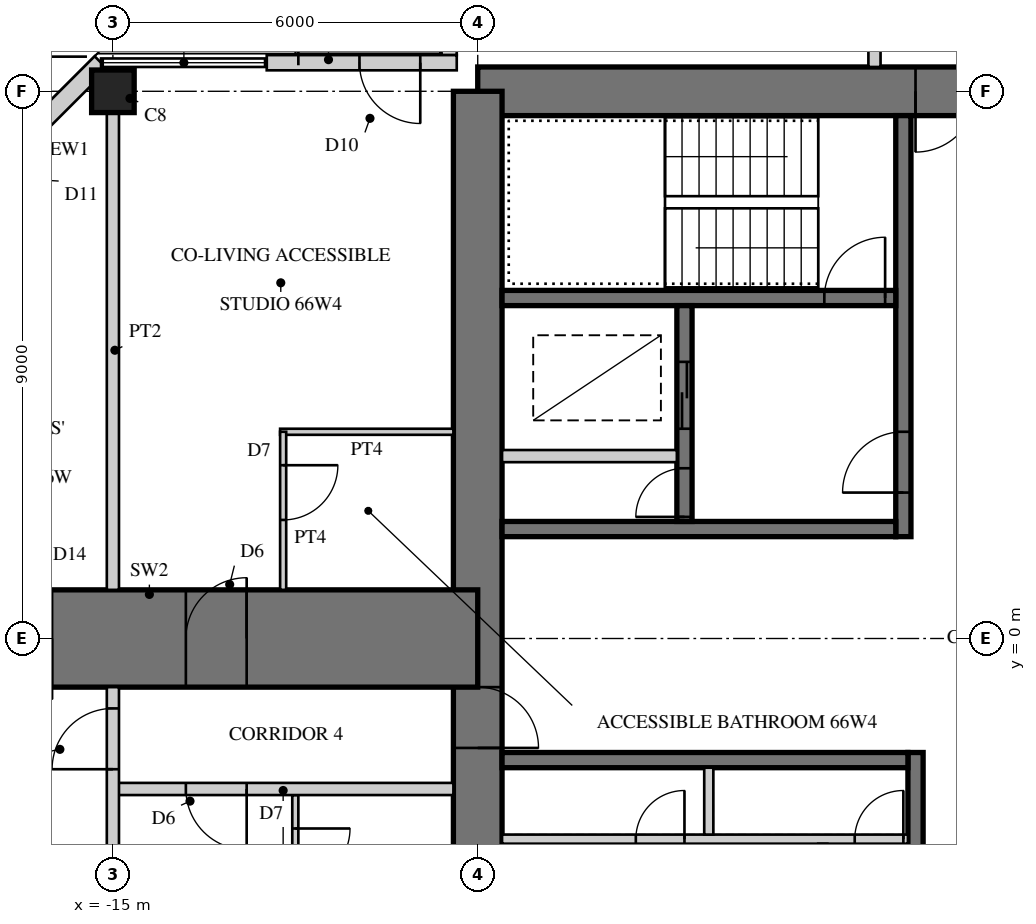
"""IFC4 building model, lengths in metres.
Left out: names, types, materials, properties, quantities, classifications, styles, units other than length and angle.
Written with IfcOpenShell. Run it as: python <this file> out.ifc"""

import sys

from ifc_helpers import new_model, si_unit, direction, frame, frame_2d, origin, origin_2d, place, context, subcontext, project, spatial, rectangle, hollow_rectangle, extrude, element, fill, save


model = new_model("IFC4")
c1 = context("Model", 3, precision=1e-05, world=origin(), true_north=direction((0.0, 1.0)))
c2 = subcontext(c1, "Body", "Model", "MODEL_VIEW")
j1 = project(units=[si_unit("LENGTHUNIT", "METRE"), si_unit("PLANEANGLEUNIT", "RADIAN")], contexts=[c1])
p1 = place(None, origin())
s1 = spatial("IfcSite", under=j1, at=p1, CompositionType="ELEMENT")
p2 = place(p1, origin())
s2 = spatial("IfcBuilding", under=s1, at=p2, CompositionType="ELEMENT")
p3 = place(p2, frame((0.0, 0.0, 257.7)))
s3 = spatial("IfcBuildingStorey", under=s2, at=p3, CompositionType="ELEMENT", Elevation=257.7)
p4 = place(p3, frame((9.0, 9.0, 0.0), z_axis=(0.0, 0.0, 1.0), x_axis=(-1.0, 0.0, 0.0)))
e1 = element("IfcWall", 1, at=p4, inside=s3, PredefinedType="SHEAR", context=c2, shape_type="SweptSolid", body=[
    extrude(rectangle(XDim=18.0, YDim=0.8, at=frame_2d((9.0, 0.0))), origin(), (0.0, 0.0, 1.0), 3.4),
])
p5 = place(p4, frame((9.8, 0.0, 0.0)))
e2 = element("IfcOpeningElement", 2, at=p5, cuts=e1, PredefinedType="OPENING", context=c2, shape_type="SweptSolid", body=[
    extrude(rectangle(XDim=1.0, YDim=2.4, at=frame_2d((0.5, 1.2))), frame((0.0, 0.41, 0.0), z_axis=(0.0, -1.0, 0.0), x_axis=(1.0, 0.0, 0.0)), (0.0, 0.0, 1.0), 0.82),
])
p6 = place(p3, frame((-9.0, 9.0, 0.0), z_axis=(0.0, 0.0, 1.0), x_axis=(0.0, -1.0, 0.0)))
e3 = element("IfcWall", 3, at=p6, inside=s3, PredefinedType="SHEAR", context=c2, shape_type="SweptSolid", body=[
    extrude(rectangle(XDim=18.0, YDim=0.8, at=frame_2d((9.0, 0.0))), origin(), (0.0, 0.0, 1.0), 3.4),
])
p7 = place(p6, frame((9.8, 0.0, 0.0)))
e4 = element("IfcOpeningElement", 4, at=p7, cuts=e3, PredefinedType="OPENING", context=c2, shape_type="SweptSolid", body=[
    extrude(rectangle(XDim=1.0, YDim=2.4, at=frame_2d((0.5, 1.2))), frame((0.0, 0.41, 0.0), z_axis=(0.0, -1.0, 0.0), x_axis=(1.0, 0.0, 0.0)), (0.0, 0.0, 1.0), 0.82),
])
p8 = place(p3, frame((-2.0, 1.675, 0.0), z_axis=(0.0, 0.0, 1.0), x_axis=(0.0, 1.0, 0.0)))
e5 = element("IfcWall", 5, at=p8, inside=s3, PredefinedType="SHEAR", context=c2, shape_type="SweptSolid", body=[
    extrude(rectangle(XDim=6.925, YDim=0.25, at=frame_2d((3.462, 0.0))), origin(), (0.0, 0.0, 1.0), 3.4),
])
p9 = place(p8, frame((0.725, 0.0, 0.0)))
e6 = element("IfcOpeningElement", 6, at=p9, cuts=e5, PredefinedType="OPENING", context=c2, shape_type="SweptSolid", body=[
    extrude(rectangle(XDim=1.0, YDim=2.1, at=frame_2d((0.5, 1.05))), frame((0.0, 0.135, 0.0), z_axis=(0.0, -1.0, 0.0), x_axis=(1.0, 0.0, 0.0)), (0.0, 0.0, 1.0), 0.27),
])
p10 = place(p3, frame((-2.125, 1.8, 0.0), z_axis=(0.0, 0.0, 1.0), x_axis=(-1.0, 0.0, 0.0)))
e7 = element("IfcWall", 7, at=p10, inside=s3, PredefinedType="SHEAR", context=c2, shape_type="SweptSolid", body=[
    extrude(rectangle(XDim=6.475, YDim=0.25, at=frame_2d((3.238, 0.0))), origin(), (0.0, 0.0, 1.0), 3.4),
])
p11 = place(p3, frame((-2.125, 5.6, 0.0), z_axis=(0.0, 0.0, 1.0), x_axis=(-1.0, 0.0, 0.0)))
e8 = element("IfcWall", 8, at=p11, inside=s3, PredefinedType="SHEAR", context=c2, shape_type="SweptSolid", body=[
    extrude(rectangle(XDim=6.475, YDim=0.25, at=frame_2d((3.238, 0.0))), origin(), (0.0, 0.0, 1.0), 3.4),
])
p12 = place(p11, frame((0.175, 0.0, 0.0)))
e9 = element("IfcOpeningElement", 9, at=p12, cuts=e8, PredefinedType="OPENING", context=c2, shape_type="SweptSolid", body=[
    extrude(rectangle(XDim=1.0, YDim=2.1, at=frame_2d((0.5, 1.05))), frame((0.0, 0.135, 0.0), z_axis=(0.0, -1.0, 0.0), x_axis=(1.0, 0.0, 0.0)), (0.0, 0.0, 1.0), 0.27),
])
p13 = place(p3, frame((-5.6, 1.925, 0.0), z_axis=(0.0, 0.0, 1.0), x_axis=(0.0, 1.0, 0.0)))
e10 = element("IfcWall", 10, at=p13, inside=s3, PredefinedType="SHEAR", context=c2, shape_type="SweptSolid", body=[
    extrude(rectangle(XDim=3.55, YDim=0.25, at=frame_2d((1.775, 0.0))), origin(), (0.0, 0.0, 1.0), 3.4),
])
p14 = place(p13, frame((1.525, 0.0, 0.0)))
e11 = element("IfcOpeningElement", 11, at=p14, cuts=e10, PredefinedType="OPENING", context=c2, shape_type="SweptSolid", body=[
    extrude(rectangle(XDim=1.1, YDim=2.2, at=frame_2d((0.55, 1.1))), frame((0.0, 0.135, 0.0), z_axis=(0.0, -1.0, 0.0), x_axis=(1.0, 0.0, 0.0)), (0.0, 0.0, 1.0), 0.27),
])
p15 = place(p13, frame((0.075, 0.0, 0.0)))
e12 = element("IfcOpeningElement", 12, at=p15, cuts=e10, PredefinedType="OPENING", context=c2, shape_type="SweptSolid", body=[
    extrude(rectangle(XDim=0.8, YDim=2.1, at=frame_2d((0.4, 1.05))), frame((0.0, 0.135, 0.0), z_axis=(0.0, -1.0, 0.0), x_axis=(1.0, 0.0, 0.0)), (0.0, 0.0, 1.0), 0.27),
])
p16 = place(p3, frame((-5.725, 3.0, 0.0), z_axis=(0.0, 0.0, 1.0), x_axis=(-1.0, 0.0, 0.0)))
e13 = element("IfcWall", 13, at=p16, inside=s3, PredefinedType="PARTITIONING", context=c2, shape_type="SweptSolid", body=[
    extrude(rectangle(XDim=2.875, YDim=0.2, at=frame_2d((1.438, 0.0))), origin(), (0.0, 0.0, 1.0), 3.4),
])
p17 = place(p3, frame((-1.8, -1.875, 0.0), z_axis=(0.0, 0.0, 1.0), x_axis=(0.0, -1.0, 0.0)))
e14 = element("IfcWall", 14, at=p17, inside=s3, PredefinedType="SHEAR", context=c2, shape_type="SweptSolid", body=[
    extrude(rectangle(XDim=6.725, YDim=0.25, at=frame_2d((3.363, 0.0))), origin(), (0.0, 0.0, 1.0), 3.4),
])
p18 = place(p17, frame((1.875, 0.0, 0.0)))
e15 = element("IfcOpeningElement", 15, at=p18, cuts=e14, PredefinedType="OPENING", context=c2, shape_type="SweptSolid", body=[
    extrude(rectangle(XDim=1.6, YDim=2.4, at=frame_2d((0.8, 1.2))), frame((0.0, 0.135, 0.0), z_axis=(0.0, -1.0, 0.0), x_axis=(1.0, 0.0, 0.0)), (0.0, 0.0, 1.0), 0.27),
])
p19 = place(p3, frame((-1.925, -2.0, 0.0), z_axis=(0.0, 0.0, 1.0), x_axis=(-1.0, 0.0, 0.0)))
e16 = element("IfcWall", 16, at=p19, inside=s3, PredefinedType="SHEAR", context=c2, shape_type="SweptSolid", body=[
    extrude(rectangle(XDim=6.675, YDim=0.25, at=frame_2d((3.337, 0.0))), origin(), (0.0, 0.0, 1.0), 3.4),
])
p20 = place(p3, frame((-1.925, -3.3, 0.0), z_axis=(0.0, 0.0, 1.0), x_axis=(-1.0, 0.0, 0.0)))
e17 = element("IfcWall", 17, at=p20, inside=s3, PredefinedType="PARTITIONING", context=c2, shape_type="SweptSolid", body=[
    extrude(rectangle(XDim=6.675, YDim=0.15, at=frame_2d((3.337, 0.0))), origin(), (0.0, 0.0, 1.0), 3.4),
])
p21 = place(p20, frame((0.075, 0.0, 0.0)))
e18 = element("IfcOpeningElement", 18, at=p21, cuts=e17, PredefinedType="OPENING", context=c2, shape_type="SweptSolid", body=[
    extrude(rectangle(XDim=0.8, YDim=2.1, at=frame_2d((0.4, 1.05))), frame((0.0, 0.085, 0.0), z_axis=(0.0, -1.0, 0.0), x_axis=(1.0, 0.0, 0.0)), (0.0, 0.0, 1.0), 0.17),
])
p22 = place(p20, frame((3.675, 0.0, 0.0)))
e19 = element("IfcOpeningElement", 19, at=p22, cuts=e17, PredefinedType="OPENING", context=c2, shape_type="SweptSolid", body=[
    extrude(rectangle(XDim=0.8, YDim=2.1, at=frame_2d((0.4, 1.05))), frame((0.0, 0.085, 0.0), z_axis=(0.0, -1.0, 0.0), x_axis=(1.0, 0.0, 0.0)), (0.0, 0.0, 1.0), 0.17),
])
p23 = place(p3, frame((-5.2, -2.125, 0.0), z_axis=(0.0, 0.0, 1.0), x_axis=(0.0, -1.0, 0.0)))
e20 = element("IfcWall", 20, at=p23, inside=s3, PredefinedType="PARTITIONING", context=c2, shape_type="SweptSolid", body=[
    extrude(rectangle(XDim=1.1, YDim=0.15, at=frame_2d((0.55, 0.0))), origin(), (0.0, 0.0, 1.0), 3.4),
])
p24 = place(p3, frame((-9.0, 0.0, 0.0), z_axis=(0.0, 0.0, 1.0), x_axis=(-1.0, 0.0, 0.0)))
e21 = element("IfcWall", 21, at=p24, inside=s3, PredefinedType="SHEAR", context=c2, shape_type="SweptSolid", body=[
    extrude(rectangle(XDim=9.0, YDim=1.6, at=frame_2d((4.5, 0.0))), origin(), (0.0, 0.0, 1.0), 3.4),
])
p25 = place(p24, frame((3.8, 0.0, 0.0)))
e22 = element("IfcOpeningElement", 22, at=p25, cuts=e21, PredefinedType="OPENING", context=c2, shape_type="SweptSolid", body=[
    extrude(rectangle(XDim=1.0, YDim=2.15, at=frame_2d((0.5, 1.075))), frame((0.0, 0.81, 0.0), z_axis=(0.0, -1.0, 0.0), x_axis=(1.0, 0.0, 0.0)), (0.0, 0.0, 1.0), 1.62),
])
p26 = place(p24, frame((7.0, 0.0, 0.0)))
e23 = element("IfcOpeningElement", 23, at=p26, cuts=e21, PredefinedType="OPENING", context=c2, shape_type="SweptSolid", body=[
    extrude(rectangle(XDim=1.0, YDim=2.2, at=frame_2d((0.5, 1.1))), frame((0.0, 0.81, 0.0), z_axis=(0.0, -1.0, 0.0), x_axis=(1.0, 0.0, 0.0)), (0.0, 0.0, 1.0), 1.62),
])
p27 = place(p3, frame((-15.0, 9.0, 0.0), z_axis=(0.0, 0.0, 1.0), x_axis=(1.0, 0.0, 0.0)))
e24 = element("IfcColumn", 24, at=p27, inside=s3, PredefinedType="COLUMN", context=c2, shape_type="SweptSolid", body=[
    extrude(rectangle(XDim=0.7, YDim=0.7, at=origin_2d()), origin(), (0.0, 0.0, 1.0), 3.4),
])
p28 = place(p3, frame((-9.47, 12.47, 0.0), z_axis=(0.0, 0.0, 1.0), x_axis=(0.0, -1.0, 0.0)))
e25 = element("IfcWall", 25, at=p28, inside=s3, PredefinedType="SOLIDWALL", context=c2, shape_type="SweptSolid", body=[
    extrude(rectangle(XDim=2.875, YDim=0.25, at=frame_2d((1.438, 0.0))), origin(), (0.0, 0.0, 1.0), 3.22),
])
p29 = place(p28, frame((0.6, 0.0, 0.0)))
e26 = element("IfcOpeningElement", 26, at=p29, cuts=e25, PredefinedType="OPENING", context=c2, shape_type="SweptSolid", body=[
    extrude(rectangle(XDim=1.0, YDim=2.2, at=frame_2d((0.5, 1.1))), frame((0.0, 0.135, 0.0), z_axis=(0.0, -1.0, 0.0), x_axis=(1.0, 0.0, 0.0)), (0.0, 0.0, 1.0), 0.27),
])
p30 = place(p3, frame((-9.345, 9.47, 0.0), z_axis=(0.0, 0.0, 1.0), x_axis=(-1.0, 0.0, 0.0)))
e27 = element("IfcWall", 27, at=p30, inside=s3, PredefinedType="SOLIDWALL", context=c2, shape_type="SweptSolid", body=[
    extrude(rectangle(XDim=3.125, YDim=0.25, at=frame_2d((1.562, 0.0))), origin(), (0.0, 0.0, 1.0), 3.22),
])
p31 = place(p30, frame((0.6, 0.0, 0.0)))
e28 = element("IfcOpeningElement", 28, at=p31, cuts=e27, PredefinedType="OPENING", context=c2, shape_type="SweptSolid", body=[
    extrude(rectangle(XDim=1.0, YDim=2.2, at=frame_2d((0.5, 1.1))), frame((0.0, 0.135, 0.0), z_axis=(0.0, -1.0, 0.0), x_axis=(1.0, 0.0, 0.0)), (0.0, 0.0, 1.0), 0.27),
])
p32 = place(p3, frame((-15.195, 9.47, 0.0), z_axis=(0.0, 0.0, 1.0), x_axis=(-0.707106781187, -0.707106781187, 0.0)))
e29 = element("IfcWall", 29, at=p32, inside=s3, PredefinedType="SOLIDWALL", context=c2, shape_type="SweptSolid", body=[
    extrude(rectangle(XDim=4.632, YDim=0.3, at=frame_2d((2.316, 0.0))), origin(), (0.0, 0.0, 1.0), 3.22),
])
p33 = place(p32, frame((2.15, 0.0, 0.0)))
e30 = element("IfcOpeningElement", 30, at=p33, cuts=e29, PredefinedType="OPENING", context=c2, shape_type="SweptSolid", body=[
    extrude(rectangle(XDim=1.0, YDim=2.4, at=frame_2d((0.5, 1.2))), frame((0.0, 0.16, 0.0), z_axis=(0.0, -1.0, 0.0), x_axis=(1.0, 0.0, 0.0)), (0.0, 0.0, 1.0), 0.32),
])
p34 = place(p3, frame((-2.475, 9.4, 0.0), z_axis=(0.0, 0.0, 1.0), x_axis=(0.0, 1.0, 0.0)))
e31 = element("IfcWall", 31, at=p34, inside=s3, PredefinedType="SOLIDWALL", context=c2, shape_type="SweptSolid", body=[
    extrude(rectangle(XDim=5.6, YDim=0.2, at=frame_2d((2.8, 0.0))), origin(), (0.0, 0.0, 1.0), 3.22),
])
p35 = place(p34, frame((1.2, 0.0, 0.0)))
e32 = element("IfcOpeningElement", 32, at=p35, cuts=e31, PredefinedType="OPENING", context=c2, shape_type="SweptSolid", body=[
    extrude(rectangle(XDim=1.0, YDim=2.2, at=frame_2d((0.5, 1.1))), frame((0.0, 0.11, 0.0), z_axis=(0.0, -1.0, 0.0), x_axis=(1.0, 0.0, 0.0)), (0.0, 0.0, 1.0), 0.22),
])
p36 = place(p3, frame((-12.0, -2.575, 0.0), z_axis=(0.0, 0.0, 1.0), x_axis=(0.0, -1.0, 0.0)))
e33 = element("IfcWall", 33, at=p36, inside=s3, PredefinedType="PARTITIONING", context=c2, shape_type="SweptSolid", body=[
    extrude(rectangle(XDim=2.2, YDim=0.1, at=frame_2d((1.1, 0.0))), origin(), (0.0, 0.0, 1.0), 3.22),
])
p37 = place(p36, frame((0.55, 0.0, 0.0)))
e34 = element("IfcOpeningElement", 34, at=p37, cuts=e33, PredefinedType="OPENING", context=c2, shape_type="SweptSolid", body=[
    extrude(rectangle(XDim=0.9, YDim=2.1, at=frame_2d((0.45, 1.05))), frame((0.0, 0.06, 0.0), z_axis=(0.0, -1.0, 0.0), x_axis=(1.0, 0.0, 0.0)), (0.0, 0.0, 1.0), 0.12),
])
p38 = place(p3, frame((-9.4, 3.4, 0.0), z_axis=(0.0, 0.0, 1.0), x_axis=(-1.0, 0.0, 0.0)))
e35 = element("IfcWall", 35, at=p38, inside=s3, PredefinedType="PARTITIONING", context=c2, shape_type="SweptSolid", body=[
    extrude(rectangle(XDim=2.85, YDim=0.1, at=frame_2d((1.425, 0.0))), origin(), (0.0, 0.0, 1.0), 3.22),
])
p39 = place(p3, frame((-12.2, 3.4, 0.0), z_axis=(0.0, 0.0, 1.0), x_axis=(0.0, -1.0, 0.0)))
e36 = element("IfcWall", 36, at=p39, inside=s3, PredefinedType="PARTITIONING", context=c2, shape_type="SweptSolid", body=[
    extrude(rectangle(XDim=2.6, YDim=0.1, at=frame_2d((1.3, 0.0))), origin(), (0.0, 0.0, 1.0), 3.22),
])
p40 = place(p39, frame((0.55, 0.0, 0.0)))
e37 = element("IfcOpeningElement", 37, at=p40, cuts=e36, PredefinedType="OPENING", context=c2, shape_type="SweptSolid", body=[
    extrude(rectangle(XDim=0.9, YDim=2.1, at=frame_2d((0.45, 1.05))), frame((0.0, 0.06, 0.0), z_axis=(0.0, -1.0, 0.0), x_axis=(1.0, 0.0, 0.0)), (0.0, 0.0, 1.0), 0.12),
])
p41 = place(p3, frame((-9.4, -2.475, 0.0), z_axis=(0.0, 0.0, 1.0), x_axis=(-1.0, 0.0, 0.0)))
e38 = element("IfcWall", 38, at=p41, inside=s3, PredefinedType="SOLIDWALL", context=c2, shape_type="SweptSolid", body=[
    extrude(rectangle(XDim=5.6, YDim=0.2, at=frame_2d((2.8, 0.0))), origin(), (0.0, 0.0, 1.0), 3.22),
])
p42 = place(p41, frame((3.4, 0.0, 0.0)))
e39 = element("IfcOpeningElement", 39, at=p42, cuts=e38, PredefinedType="OPENING", context=c2, shape_type="SweptSolid", body=[
    extrude(rectangle(XDim=1.0, YDim=2.15, at=frame_2d((0.5, 1.075))), frame((0.0, 0.11, 0.0), z_axis=(0.0, -1.0, 0.0), x_axis=(1.0, 0.0, 0.0)), (0.0, 0.0, 1.0), 0.22),
])
p43 = place(p3, frame((-15.0, 8.65, 0.0), z_axis=(0.0, 0.0, 1.0), x_axis=(0.0, -1.0, 0.0)))
e40 = element("IfcWall", 40, at=p43, inside=s3, PredefinedType="SOLIDWALL", context=c2, shape_type="SweptSolid", body=[
    extrude(rectangle(XDim=7.85, YDim=0.2, at=frame_2d((3.925, 0.0))), origin(), (0.0, 0.0, 1.0), 2.52),
])
p44 = place(p3, frame((-15.0, -0.8, 0.0), z_axis=(0.0, 0.0, 1.0), x_axis=(0.0, -1.0, 0.0)))
e41 = element("IfcWall", 41, at=p44, inside=s3, PredefinedType="SOLIDWALL", context=c2, shape_type="SweptSolid", body=[
    extrude(rectangle(XDim=7.85, YDim=0.2, at=frame_2d((3.925, 0.0))), origin(), (0.0, 0.0, 1.0), 2.52),
])
p45 = place(p44, frame((0.35, 0.0, 0.0)))
e42 = element("IfcOpeningElement", 42, at=p45, cuts=e41, PredefinedType="OPENING", context=c2, shape_type="SweptSolid", body=[
    extrude(rectangle(XDim=1.0, YDim=2.2, at=frame_2d((0.5, 1.1))), frame((0.0, 0.11, 0.0), z_axis=(0.0, -1.0, 0.0), x_axis=(1.0, 0.0, 0.0)), (0.0, 0.0, 1.0), 0.22),
])
p46 = place(p31, origin())
e43 = element("IfcDoor", 43, at=p46, inside=s3, OperationType="SINGLE_SWING_LEFT", PredefinedType="DOOR", context=c2, shape_type="SweptSolid", body=[
    extrude(hollow_rectangle(XDim=1.0, YDim=2.2, WallThickness=0.06, at=frame_2d((0.5, 1.1))), frame((0.0, 0.025, 0.0), z_axis=(0.0, -1.0, 0.0), x_axis=(1.0, 0.0, 0.0)), (0.0, 0.0, 1.0), 0.05),
    extrude(rectangle(XDim=0.879, YDim=2.079, at=frame_2d((0.5, 1.1))), frame((0.0, 0.025, 0.0), z_axis=(0.0, -1.0, 0.0), x_axis=(1.0, 0.0, 0.0)), (0.0, 0.0, 1.0), 0.05),
])
fill(e28, e43)
p47 = place(p37, origin())
e44 = element("IfcDoor", 44, at=p47, inside=s3, OperationType="SINGLE_SWING_LEFT", PredefinedType="DOOR", context=c2, shape_type="SweptSolid", body=[
    extrude(rectangle(XDim=0.9, YDim=2.1, at=frame_2d((0.45, 1.05))), frame((0.0, 0.025, 0.0), z_axis=(0.0, -1.0, 0.0), x_axis=(1.0, 0.0, 0.0)), (0.0, 0.0, 1.0), 0.05),
])
fill(e34, e44)
p48 = place(p40, origin())
e45 = element("IfcDoor", 45, at=p48, inside=s3, OperationType="SINGLE_SWING_LEFT", PredefinedType="DOOR", context=c2, shape_type="SweptSolid", body=[
    extrude(rectangle(XDim=0.9, YDim=2.1, at=frame_2d((0.45, 1.05))), frame((0.0, 0.025, 0.0), z_axis=(0.0, -1.0, 0.0), x_axis=(1.0, 0.0, 0.0)), (0.0, 0.0, 1.0), 0.05),
])
fill(e37, e45)
p49 = place(p42, origin())
e46 = element("IfcDoor", 46, at=p49, inside=s3, OperationType="SINGLE_SWING_LEFT", PredefinedType="DOOR", context=c2, shape_type="SweptSolid", body=[
    extrude(rectangle(XDim=1.0, YDim=2.15, at=frame_2d((0.5, 1.075))), frame((0.0, 0.025, 0.0), z_axis=(0.0, -1.0, 0.0), x_axis=(1.0, 0.0, 0.0)), (0.0, 0.0, 1.0), 0.05),
])
fill(e39, e46)
p50 = place(p45, frame((1.0, 0.0, 0.0), z_axis=(0.0, 0.0, 1.0), x_axis=(-1.0, 0.0, 0.0)))
e47 = element("IfcDoor", 47, at=p50, inside=s3, OperationType="SINGLE_SWING_LEFT", PredefinedType="DOOR", context=c2, shape_type="SweptSolid", body=[
    extrude(rectangle(XDim=1.0, YDim=2.2, at=frame_2d((0.5, 1.1))), frame((0.0, 0.025, 0.0), z_axis=(0.0, -1.0, 0.0), x_axis=(1.0, 0.0, 0.0)), (0.0, 0.0, 1.0), 0.05),
])
fill(e42, e47)
p51 = place(p25, frame((1.0, 0.0, 0.0), z_axis=(0.0, 0.0, 1.0), x_axis=(-1.0, 0.0, 0.0)))
e48 = element("IfcDoor", 48, at=p51, inside=s3, OperationType="SINGLE_SWING_RIGHT", PredefinedType="DOOR", context=c2, shape_type="SweptSolid", body=[
    extrude(rectangle(XDim=1.0, YDim=2.15, at=frame_2d((0.5, 1.075))), frame((0.0, 0.025, 0.0), z_axis=(0.0, -1.0, 0.0), x_axis=(1.0, 0.0, 0.0)), (0.0, 0.0, 1.0), 0.05),
])
fill(e22, e48)
p52 = place(p5, origin())
e49 = element("IfcDoor", 49, at=p52, inside=s3, OperationType="SINGLE_SWING_RIGHT", PredefinedType="DOOR", context=c2, shape_type="SweptSolid", body=[
    extrude(rectangle(XDim=1.0, YDim=2.4, at=frame_2d((0.5, 1.2))), frame((0.0, 0.055, 0.0), z_axis=(0.0, -1.0, 0.0), x_axis=(1.0, 0.0, 0.0)), (0.0, 0.0, 1.0), 0.05),
])
fill(e2, e49)
p53 = place(p7, origin())
e50 = element("IfcDoor", 50, at=p53, inside=s3, OperationType="SINGLE_SWING_RIGHT", PredefinedType="DOOR", context=c2, shape_type="SweptSolid", body=[
    extrude(rectangle(XDim=1.0, YDim=2.4, at=frame_2d((0.5, 1.2))), frame((0.0, 0.055, 0.0), z_axis=(0.0, -1.0, 0.0), x_axis=(1.0, 0.0, 0.0)), (0.0, 0.0, 1.0), 0.05),
])
fill(e4, e50)
p54 = place(p9, origin())
e51 = element("IfcDoor", 51, at=p54, inside=s3, OperationType="SINGLE_SWING_LEFT", PredefinedType="DOOR", context=c2, shape_type="SweptSolid", body=[
    extrude(rectangle(XDim=1.0, YDim=2.1, at=frame_2d((0.5, 1.05))), frame((0.0, 0.025, 0.0), z_axis=(0.0, -1.0, 0.0), x_axis=(1.0, 0.0, 0.0)), (0.0, 0.0, 1.0), 0.05),
])
fill(e6, e51)
p55 = place(p12, frame((1.0, 0.0, 0.0), z_axis=(0.0, 0.0, 1.0), x_axis=(-1.0, 0.0, 0.0)))
e52 = element("IfcDoor", 52, at=p55, inside=s3, OperationType="SINGLE_SWING_RIGHT", PredefinedType="DOOR", context=c2, shape_type="SweptSolid", body=[
    extrude(rectangle(XDim=1.0, YDim=2.1, at=frame_2d((0.5, 1.05))), frame((0.0, 0.025, 0.0), z_axis=(0.0, -1.0, 0.0), x_axis=(1.0, 0.0, 0.0)), (0.0, 0.0, 1.0), 0.05),
])
fill(e9, e52)
p56 = place(p14, origin())
e53 = element("IfcDoor", 53, at=p56, inside=s3, OperationType="DOUBLE_DOOR_SLIDING", PredefinedType="DOOR", context=c2, shape_type="SweptSolid", body=[
    extrude(rectangle(XDim=1.1, YDim=2.2, at=frame_2d((0.55, 1.1))), frame((0.0, 0.025, 0.0), z_axis=(0.0, -1.0, 0.0), x_axis=(1.0, 0.0, 0.0)), (0.0, 0.0, 1.0), 0.05),
])
fill(e11, e53)
p57 = place(p15, origin())
e54 = element("IfcDoor", 54, at=p57, inside=s3, OperationType="SINGLE_SWING_LEFT", PredefinedType="DOOR", context=c2, shape_type="SweptSolid", body=[
    extrude(rectangle(XDim=0.8, YDim=2.1, at=frame_2d((0.4, 1.05))), frame((0.0, 0.025, 0.0), z_axis=(0.0, -1.0, 0.0), x_axis=(1.0, 0.0, 0.0)), (0.0, 0.0, 1.0), 0.05),
])
fill(e12, e54)
p58 = place(p21, frame((0.8, 0.0, 0.0), z_axis=(0.0, 0.0, 1.0), x_axis=(-1.0, 0.0, 0.0)))
e55 = element("IfcDoor", 55, at=p58, inside=s3, OperationType="SINGLE_SWING_RIGHT", PredefinedType="DOOR", context=c2, shape_type="SweptSolid", body=[
    extrude(rectangle(XDim=0.8, YDim=2.1, at=frame_2d((0.4, 1.05))), frame((0.0, 0.025, 0.0), z_axis=(0.0, -1.0, 0.0), x_axis=(1.0, 0.0, 0.0)), (0.0, 0.0, 1.0), 0.05),
])
fill(e18, e55)
p59 = place(p22, frame((0.8, 0.0, 0.0), z_axis=(0.0, 0.0, 1.0), x_axis=(-1.0, 0.0, 0.0)))
e56 = element("IfcDoor", 56, at=p59, inside=s3, OperationType="SINGLE_SWING_RIGHT", PredefinedType="DOOR", context=c2, shape_type="SweptSolid", body=[
    extrude(rectangle(XDim=0.8, YDim=2.1, at=frame_2d((0.4, 1.05))), frame((0.0, 0.025, 0.0), z_axis=(0.0, -1.0, 0.0), x_axis=(1.0, 0.0, 0.0)), (0.0, 0.0, 1.0), 0.05),
])
fill(e19, e56)
save(model, sys.argv[1])
